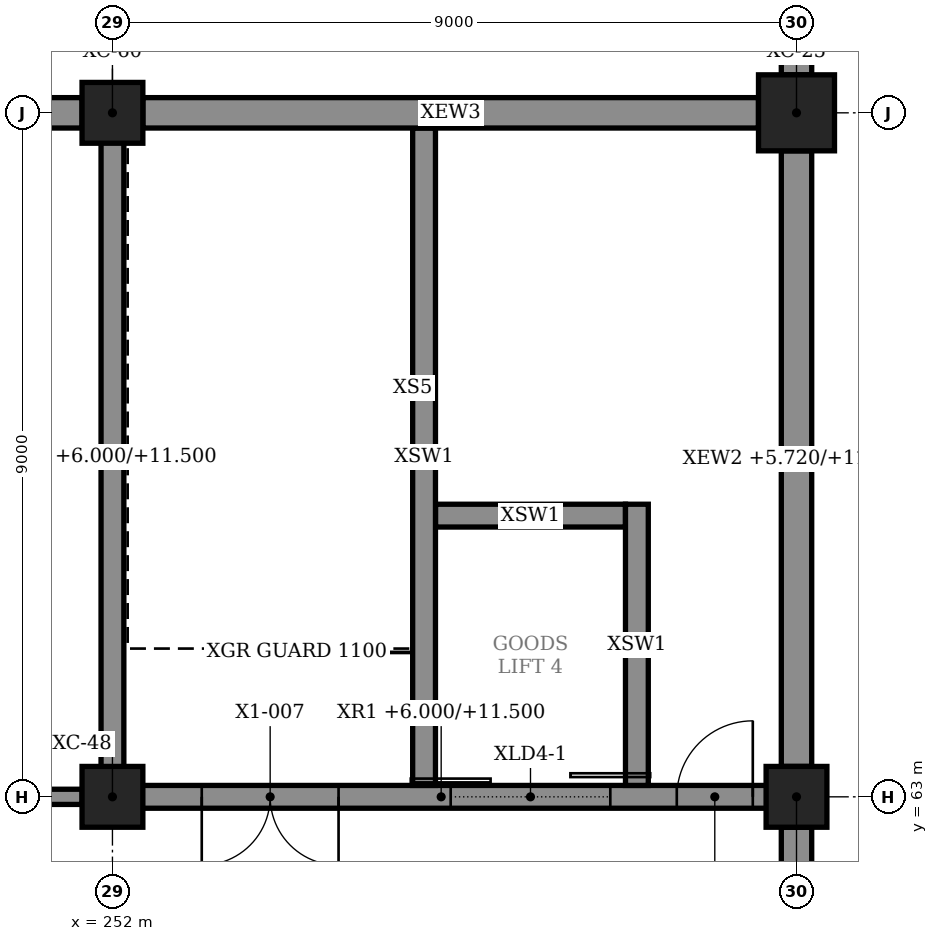
"""IFC4 building model, lengths in metres.
Left out: names, types, materials, properties, quantities, classifications, styles, units other than length and angle.
Written with IfcOpenShell. Run it as: python <this file> out.ifc"""

import sys

from ifc_helpers import new_model, si_unit, direction, frame, frame_2d, origin, origin_2d, place, context, subcontext, project, spatial, rectangle, hollow_rectangle, extrude, element, fill, save


model = new_model("IFC4")
c1 = context("Model", 3, precision=1e-05, world=origin(), true_north=direction((0.0, 1.0)))
c2 = subcontext(c1, "Body", "Model", "MODEL_VIEW")
j1 = project(units=[si_unit("LENGTHUNIT", "METRE"), si_unit("PLANEANGLEUNIT", "RADIAN")], contexts=[c1])
p1 = place(None, origin())
s1 = spatial("IfcSite", under=j1, at=p1, CompositionType="ELEMENT")
p2 = place(p1, origin())
s2 = spatial("IfcBuilding", under=s1, at=p2, CompositionType="ELEMENT")
p3 = place(p2, frame((0.0, 0.0, 6.0)))
s3 = spatial("IfcBuildingStorey", under=s2, at=p3, CompositionType="ELEMENT", Elevation=6.0)
p4 = place(p3, frame((261.0, 72.0, 0.0), z_axis=(0.0, 0.0, 1.0), x_axis=(1.0, 0.0, 0.0)))
e1 = element("IfcColumn", 1, at=p4, inside=s3, PredefinedType="COLUMN", context=c2, shape_type="SweptSolid", body=[
    extrude(hollow_rectangle(XDim=1.0, YDim=1.0, WallThickness=0.032, at=origin_2d()), origin(), (0.0, 0.0, 1.0), 5.5),
])
for number, where, z_axis, x_axis in (
    (2, (252.0, 63.0, 0.0), (0.0, 0.0, 1.0), (1.0, 0.0, 0.0)),
    (3, (261.0, 63.0, 0.0), (0.0, 0.0, 1.0), (1.0, 0.0, 0.0)),
    (4, (252.0, 72.0, 0.0), (0.0, 0.0, 1.0), (1.0, 0.0, 0.0)),
):
    element("IfcColumn", number, at=place(p3, frame(where, z_axis=z_axis, x_axis=x_axis)), inside=s3, PredefinedType="COLUMN", context=c2, shape_type="SweptSolid", body=[
        extrude(rectangle(XDim=0.8, YDim=0.8, at=origin_2d()), origin(), (0.0, 0.0, 1.0), 5.5),
    ])
p5 = place(p3, frame((251.85, 63.0, 0.0), z_axis=(0.0, 0.0, 1.0), x_axis=(1.0, 0.0, 0.0)))
e5 = element("IfcWall", 5, at=p5, inside=s3, PredefinedType="SHEAR", context=c2, shape_type="SweptSolid", body=[
    extrude(rectangle(XDim=8.95, YDim=0.3, at=frame_2d((4.475, 0.0))), origin(), (0.0, 0.0, 1.0), 5.5),
])
p6 = place(p5, frame((1.325, 0.0, 0.0)))
e6 = element("IfcOpeningElement", 6, at=p6, cuts=e5, PredefinedType="OPENING", context=c2, shape_type="SweptSolid", body=[
    extrude(rectangle(XDim=1.8, YDim=2.4, at=frame_2d((0.9, 1.2))), frame((0.0, 0.16, 0.0), z_axis=(0.0, -1.0, 0.0), x_axis=(1.0, 0.0, 0.0)), (0.0, 0.0, 1.0), 0.32),
])
p7 = place(p5, frame((4.6, 0.0, 0.0)))
e7 = element("IfcOpeningElement", 7, at=p7, cuts=e5, PredefinedType="OPENING", context=c2, shape_type="SweptSolid", body=[
    extrude(rectangle(XDim=2.1, YDim=2.4, at=frame_2d((1.05, 1.2))), frame((0.0, 0.16, 0.0), z_axis=(0.0, -1.0, 0.0), x_axis=(1.0, 0.0, 0.0)), (0.0, 0.0, 1.0), 0.32),
])
p8 = place(p5, frame((7.575, 0.0, 0.0)))
e8 = element("IfcOpeningElement", 8, at=p8, cuts=e5, PredefinedType="OPENING", context=c2, shape_type="SweptSolid", body=[
    extrude(rectangle(XDim=1.0, YDim=2.4, at=frame_2d((0.5, 1.2))), frame((0.0, 0.16, 0.0), z_axis=(0.0, -1.0, 0.0), x_axis=(1.0, 0.0, 0.0)), (0.0, 0.0, 1.0), 0.32),
])
p9 = place(p3, frame((252.0, 63.15, 0.0), z_axis=(0.0, 0.0, 1.0), x_axis=(0.0, 1.0, 0.0)))
e9 = element("IfcWall", 9, at=p9, inside=s3, PredefinedType="SHEAR", context=c2, shape_type="SweptSolid", body=[
    extrude(rectangle(XDim=8.65, YDim=0.3, at=frame_2d((4.325, 0.0))), origin(), (0.0, 0.0, 1.0), 5.5),
])
for number, where, z_axis, x_axis in (
    (10, (261.0, 54.5, -0.28), (0.0, 0.0, 1.0), (0.0, 1.0, 0.0)),
    (11, (261.0, 63.4, -0.28), (0.0, 0.0, 1.0), (0.0, 1.0, 0.0)),
):
    element("IfcWall", number, at=place(p3, frame(where, z_axis=z_axis, x_axis=x_axis)), inside=s3, PredefinedType="SOLIDWALL", context=c2, shape_type="SweptSolid", body=[
        extrude(rectangle(XDim=8.1, YDim=0.4, at=frame_2d((4.05, 0.0))), origin(), (0.0, 0.0, 1.0), 5.78),
    ])
p10 = place(p3, frame((261.0, 72.5, 0.0), z_axis=(0.0, 0.0, 1.0), x_axis=(0.0, 1.0, 0.0)))
e12 = element("IfcWall", 12, at=p10, inside=s3, PredefinedType="SOLIDWALL", context=c2, shape_type="SweptSolid", body=[
    extrude(rectangle(XDim=17.0, YDim=0.4, at=frame_2d((8.5, 0.0))), origin(), (0.0, 0.0, 1.0), 5.5),
])
p11 = place(p3, frame((243.0, 72.0, -0.28), z_axis=(0.0, 0.0, 1.0), x_axis=(1.0, 0.0, 0.0)))
e13 = element("IfcWall", 13, at=p11, inside=s3, PredefinedType="SOLIDWALL", context=c2, shape_type="SweptSolid", body=[
    extrude(rectangle(XDim=8.6, YDim=0.4, at=frame_2d((4.3, 0.0))), origin(), (0.0, 0.0, 1.0), 5.78),
])
p12 = place(p3, frame((252.4, 72.0, -0.28), z_axis=(0.0, 0.0, 1.0), x_axis=(1.0, 0.0, 0.0)))
e14 = element("IfcWall", 14, at=p12, inside=s3, PredefinedType="SOLIDWALL", context=c2, shape_type="SweptSolid", body=[
    extrude(rectangle(XDim=8.1, YDim=0.4, at=frame_2d((4.05, 0.0))), origin(), (0.0, 0.0, 1.0), 5.78),
])
p13 = place(p3, frame((256.1, 63.15, 0.0), z_axis=(0.0, 0.0, 1.0), x_axis=(0.0, 1.0, 0.0)))
e15 = element("IfcWall", 15, at=p13, inside=s3, PredefinedType="SHEAR", context=c2, shape_type="SweptSolid", body=[
    extrude(rectangle(XDim=8.65, YDim=0.3, at=frame_2d((4.325, 0.0))), origin(), (0.0, 0.0, 1.0), 5.25),
])
p14 = place(p3, frame((258.9, 63.15, 0.0), z_axis=(0.0, 0.0, 1.0), x_axis=(0.0, 1.0, 0.0)))
e16 = element("IfcWall", 16, at=p14, inside=s3, PredefinedType="SHEAR", context=c2, shape_type="SweptSolid", body=[
    extrude(rectangle(XDim=3.7, YDim=0.3, at=frame_2d((1.85, 0.0))), origin(), (0.0, 0.0, 1.0), 5.25),
])
p15 = place(p3, frame((256.25, 66.7, 0.0), z_axis=(0.0, 0.0, 1.0), x_axis=(1.0, 0.0, 0.0)))
e17 = element("IfcWall", 17, at=p15, inside=s3, PredefinedType="SHEAR", context=c2, shape_type="SweptSolid", body=[
    extrude(rectangle(XDim=2.5, YDim=0.3, at=frame_2d((1.25, 0.0))), origin(), (0.0, 0.0, 1.0), 5.25),
])
p16 = place(p3, frame((225.4, 63.0, 0.0), z_axis=(0.0, 0.0, 1.0), x_axis=(1.0, 0.0, 0.0)))
e18 = element("IfcWall", 18, at=p16, inside=s3, PredefinedType="PARTITIONING", context=c2, shape_type="SweptSolid", body=[
    extrude(rectangle(XDim=26.2, YDim=0.2, at=frame_2d((13.1, 0.0))), origin(), (0.0, 0.0, 1.0), 5.25),
])
p17 = place(p16, frame((8.2, 0.0, 0.015)))
e19 = element("IfcOpeningElement", 19, at=p17, cuts=e18, PredefinedType="OPENING", context=c2, shape_type="SweptSolid", body=[
    extrude(rectangle(XDim=1.2, YDim=2.4, at=frame_2d((0.6, 1.2))), frame((0.0, 0.11, 0.0), z_axis=(0.0, -1.0, 0.0), x_axis=(1.0, 0.0, 0.0)), (0.0, 0.0, 1.0), 0.22),
])
p18 = place(p16, frame((21.4, 0.0, 0.015)))
e20 = element("IfcOpeningElement", 20, at=p18, cuts=e18, PredefinedType="OPENING", context=c2, shape_type="SweptSolid", body=[
    extrude(rectangle(XDim=1.0, YDim=2.4, at=frame_2d((0.5, 1.2))), frame((0.0, 0.11, 0.0), z_axis=(0.0, -1.0, 0.0), x_axis=(1.0, 0.0, 0.0)), (0.0, 0.0, 1.0), 0.22),
])
p19 = place(p6, frame((1.8, 0.0, 0.0), z_axis=(0.0, 0.0, 1.0), x_axis=(-1.0, 0.0, 0.0)))
e21 = element("IfcDoor", 21, at=p19, inside=s3, OperationType="DOUBLE_DOOR_SINGLE_SWING", PredefinedType="DOOR", context=c2, shape_type="SweptSolid", body=[
    extrude(rectangle(XDim=1.8, YDim=2.4, at=frame_2d((0.9, 1.2))), frame((0.0, 0.025, 0.0), z_axis=(0.0, -1.0, 0.0), x_axis=(1.0, 0.0, 0.0)), (0.0, 0.0, 1.0), 0.05),
])
fill(e6, e21)
p20 = place(p7, origin())
e22 = element("IfcDoor", 22, at=p20, inside=s3, OperationType="DOUBLE_DOOR_SLIDING", PredefinedType="DOOR", context=c2, shape_type="SweptSolid", body=[
    extrude(rectangle(XDim=2.1, YDim=2.4, at=frame_2d((1.05, 1.2))), frame((0.0, 0.025, 0.0), z_axis=(0.0, -1.0, 0.0), x_axis=(1.0, 0.0, 0.0)), (0.0, 0.0, 1.0), 0.05),
])
fill(e7, e22)
p21 = place(p8, origin())
e23 = element("IfcDoor", 23, at=p21, inside=s3, OperationType="SINGLE_SWING_RIGHT", PredefinedType="DOOR", context=c2, shape_type="SweptSolid", body=[
    extrude(rectangle(XDim=1.0, YDim=2.4, at=frame_2d((0.5, 1.2))), frame((0.0, 0.025, 0.0), z_axis=(0.0, -1.0, 0.0), x_axis=(1.0, 0.0, 0.0)), (0.0, 0.0, 1.0), 0.05),
])
fill(e8, e23)
save(model, sys.argv[1])
